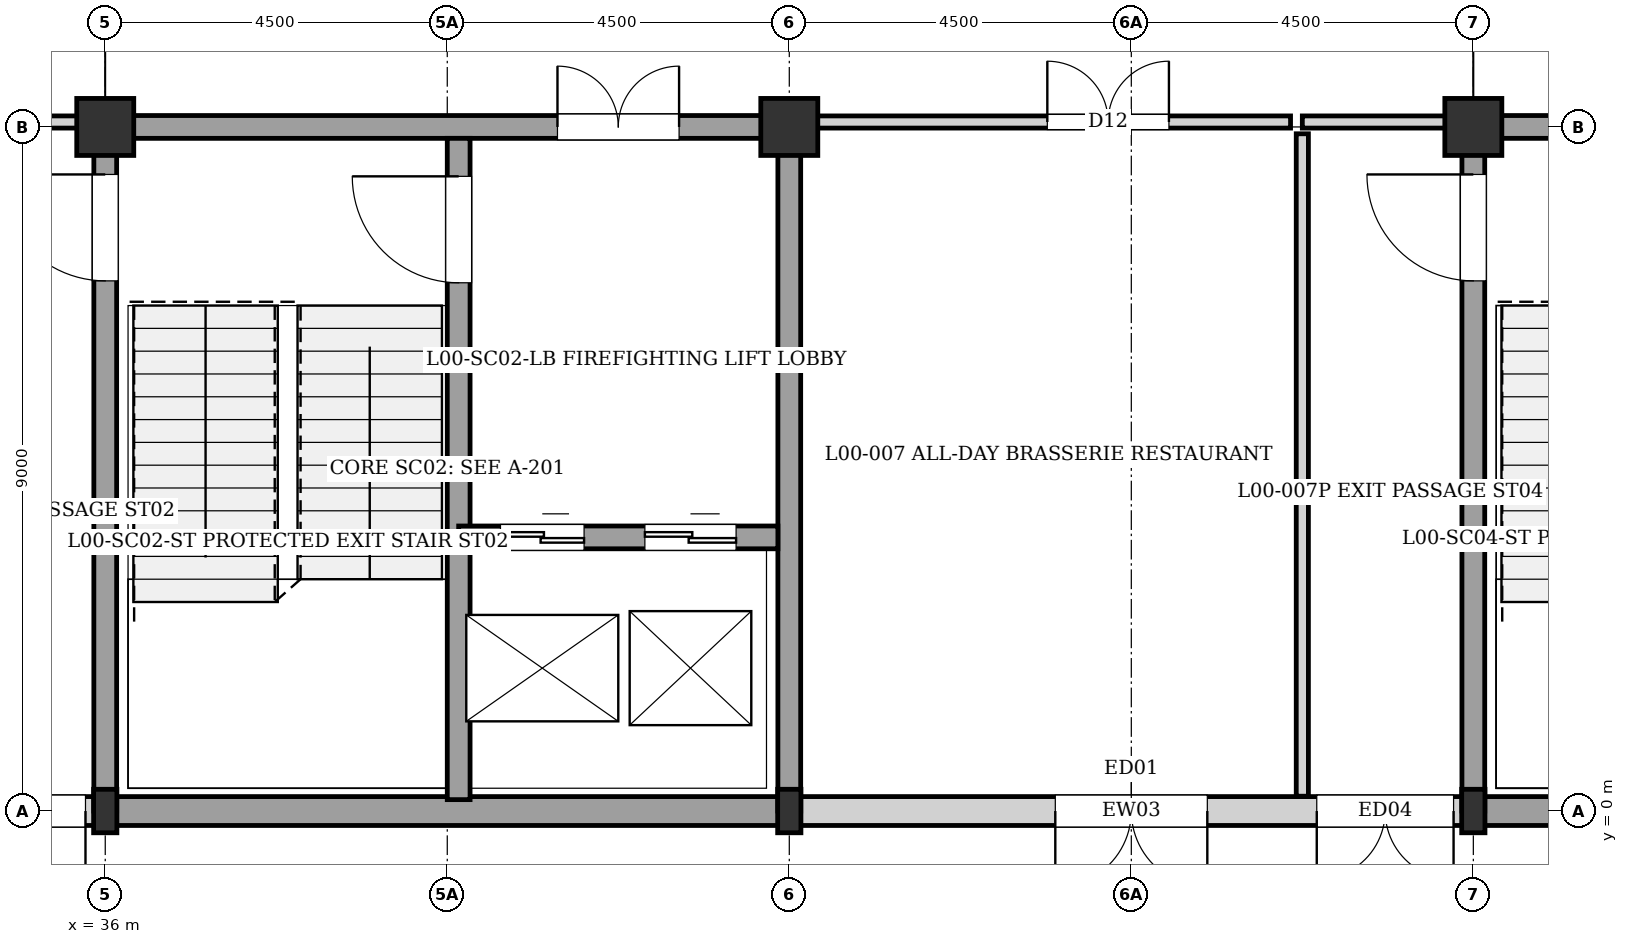
"""IFC4 building model, lengths in metres.
Left out: names, types, materials, properties, quantities, classifications, styles, units other than length and angle.
Written with IfcOpenShell. Run it as: python <this file> out.ifc"""

import sys

from ifc_helpers import new_model, si_unit, direction, frame, frame_2d, origin, origin_2d, place, context, subcontext, project, spatial, rectangle, i_section, extrude, element, fill, save


model = new_model("IFC4")
c1 = context("Model", 3, precision=1e-05, world=origin(), true_north=direction((0.0, 1.0)))
c2 = subcontext(c1, "Body", "Model", "MODEL_VIEW")
j1 = project(units=[si_unit("LENGTHUNIT", "METRE"), si_unit("PLANEANGLEUNIT", "RADIAN")], contexts=[c1])
p1 = place(None, origin())
s1 = spatial("IfcSite", under=j1, at=p1, CompositionType="ELEMENT")
p2 = place(p1, origin())
s2 = spatial("IfcBuilding", under=s1, at=p2, CompositionType="ELEMENT")
p3 = place(p2, origin())
s3 = spatial("IfcBuildingStorey", under=s2, at=p3, CompositionType="ELEMENT", Elevation=0.0)
p4 = place(p3, frame((36.0, 0.0, 0.0), z_axis=(0.0, 0.0, 1.0), x_axis=(1.0, 0.0, 0.0)))
e1 = element("IfcColumn", 1, at=p4, inside=s3, PredefinedType="COLUMN", context=c2, shape_type="SweptSolid", body=[
    extrude(i_section(OverallWidth=0.306, OverallDepth=0.572, WebThickness=0.021, FlangeThickness=0.04, at=origin_2d()), origin(), (0.0, 0.0, 1.0), 4.32),
])
p5 = place(p3, frame((36.0, 9.0, 0.0), z_axis=(0.0, 0.0, 1.0), x_axis=(1.0, 0.0, 0.0)))
e2 = element("IfcColumn", 2, at=p5, inside=s3, PredefinedType="COLUMN", context=c2, shape_type="SweptSolid", body=[
    extrude(rectangle(XDim=0.75, YDim=0.75, at=origin_2d()), origin(), (0.0, 0.0, 1.0), 4.32),
])
p6 = place(p3, frame((45.0, 0.0, 0.0), z_axis=(0.0, 0.0, 1.0), x_axis=(1.0, 0.0, 0.0)))
e3 = element("IfcColumn", 3, at=p6, inside=s3, PredefinedType="COLUMN", context=c2, shape_type="SweptSolid", body=[
    extrude(i_section(OverallWidth=0.306, OverallDepth=0.572, WebThickness=0.021, FlangeThickness=0.04, at=origin_2d()), origin(), (0.0, 0.0, 1.0), 4.32),
])
p7 = place(p3, frame((45.0, 9.0, 0.0), z_axis=(0.0, 0.0, 1.0), x_axis=(1.0, 0.0, 0.0)))
e4 = element("IfcColumn", 4, at=p7, inside=s3, PredefinedType="COLUMN", context=c2, shape_type="SweptSolid", body=[
    extrude(rectangle(XDim=0.75, YDim=0.75, at=origin_2d()), origin(), (0.0, 0.0, 1.0), 4.32),
])
p8 = place(p3, frame((54.0, 0.0, 0.0), z_axis=(0.0, 0.0, 1.0), x_axis=(1.0, 0.0, 0.0)))
e5 = element("IfcColumn", 5, at=p8, inside=s3, PredefinedType="COLUMN", context=c2, shape_type="SweptSolid", body=[
    extrude(i_section(OverallWidth=0.306, OverallDepth=0.572, WebThickness=0.021, FlangeThickness=0.04, at=origin_2d()), origin(), (0.0, 0.0, 1.0), 4.32),
])
p9 = place(p3, frame((54.0, 9.0, 0.0), z_axis=(0.0, 0.0, 1.0), x_axis=(1.0, 0.0, 0.0)))
e6 = element("IfcColumn", 6, at=p9, inside=s3, PredefinedType="COLUMN", context=c2, shape_type="SweptSolid", body=[
    extrude(rectangle(XDim=0.75, YDim=0.75, at=origin_2d()), origin(), (0.0, 0.0, 1.0), 4.32),
])
p10 = place(p3, frame((63.0, 0.0, 0.0), z_axis=(0.0, 0.0, 1.0), x_axis=(-1.0, 0.0, 0.0)))
e7 = element("IfcWall", 7, at=p10, inside=s3, PredefinedType="SOLIDWALL", context=c2, shape_type="SweptSolid", body=[
    extrude(rectangle(XDim=9.0, YDim=0.38, at=frame_2d((4.5, 0.0))), origin(), (0.0, 0.0, 1.0), 4.055),
])
p11 = place(p3, frame((53.87, 0.0, 0.0), z_axis=(0.0, 0.0, 1.0), x_axis=(-1.0, 0.0, 0.0)))
e8 = element("IfcWall", 8, at=p11, inside=s3, PredefinedType="SOLIDWALL", context=c2, shape_type="SweptSolid", body=[
    extrude(rectangle(XDim=8.74, YDim=0.38, at=frame_2d((4.37, 0.0))), origin(), (0.0, 0.0, 1.0), 3.655),
])
p12 = place(p11, frame((0.13, 0.0, 0.0)))
e9 = element("IfcOpeningElement", 9, at=p12, cuts=e8, PredefinedType="OPENING", context=c2, shape_type="SweptSolid", body=[
    extrude(rectangle(XDim=1.8, YDim=2.2, at=frame_2d((0.9, 1.1))), frame((0.0, 0.2, 0.0), z_axis=(0.0, -1.0, 0.0), x_axis=(1.0, 0.0, 0.0)), (0.0, 0.0, 1.0), 0.4),
])
p13 = place(p11, frame((3.37, 0.0, 0.0)))
e10 = element("IfcOpeningElement", 10, at=p13, cuts=e8, PredefinedType="OPENING", context=c2, shape_type="SweptSolid", body=[
    extrude(rectangle(XDim=2.0, YDim=2.4, at=frame_2d((1.0, 1.2))), frame((0.0, 0.2, 0.0), z_axis=(0.0, -1.0, 0.0), x_axis=(1.0, 0.0, 0.0)), (0.0, 0.0, 1.0), 0.4),
])
p14 = place(p3, frame((45.0, 0.0, 0.0), z_axis=(0.0, 0.0, 1.0), x_axis=(-1.0, 0.0, 0.0)))
e11 = element("IfcWall", 11, at=p14, inside=s3, PredefinedType="SOLIDWALL", context=c2, shape_type="SweptSolid", body=[
    extrude(rectangle(XDim=9.0, YDim=0.38, at=frame_2d((4.5, 0.0))), origin(), (0.0, 0.0, 1.0), 4.055),
])
p15 = place(p3, frame((35.87, 0.0, 0.0), z_axis=(0.0, 0.0, 1.0), x_axis=(-1.0, 0.0, 0.0)))
e12 = element("IfcWall", 12, at=p15, inside=s3, PredefinedType="SOLIDWALL", context=c2, shape_type="SweptSolid", body=[
    extrude(rectangle(XDim=8.87, YDim=0.38, at=frame_2d((4.435, 0.0))), origin(), (0.0, 0.0, 1.0), 3.755),
])
p16 = place(p15, frame((0.13, 0.0, 0.0)))
e13 = element("IfcOpeningElement", 13, at=p16, cuts=e12, PredefinedType="OPENING", context=c2, shape_type="SweptSolid", body=[
    extrude(rectangle(XDim=1.8, YDim=2.2, at=frame_2d((0.9, 1.1))), frame((0.0, 0.2, 0.0), z_axis=(0.0, -1.0, 0.0), x_axis=(1.0, 0.0, 0.0)), (0.0, 0.0, 1.0), 0.4),
])
p17 = place(p15, frame((3.37, 0.0, 0.0)))
e14 = element("IfcOpeningElement", 14, at=p17, cuts=e12, PredefinedType="OPENING", context=c2, shape_type="SweptSolid", body=[
    extrude(rectangle(XDim=2.0, YDim=2.4, at=frame_2d((1.0, 1.2))), frame((0.0, 0.2, 0.0), z_axis=(0.0, -1.0, 0.0), x_axis=(1.0, 0.0, 0.0)), (0.0, 0.0, 1.0), 0.4),
])
p18 = place(p3, frame((45.0, 0.0, 0.0), z_axis=(0.0, 0.0, 1.0), x_axis=(0.0, 1.0, 0.0)))
e15 = element("IfcWall", 15, at=p18, inside=s3, PredefinedType="SHEAR", context=c2, shape_type="SweptSolid", body=[
    extrude(rectangle(XDim=9.0, YDim=0.3, at=frame_2d((4.5, 0.0))), origin(), (0.0, 0.0, 1.0), 4.055),
])
p19 = place(p3, frame((36.0, 9.0, 0.0), z_axis=(0.0, 0.0, 1.0), x_axis=(1.0, 0.0, 0.0)))
e16 = element("IfcWall", 16, at=p19, inside=s3, PredefinedType="SHEAR", context=c2, shape_type="SweptSolid", body=[
    extrude(rectangle(XDim=9.0, YDim=0.3, at=frame_2d((4.5, 0.0))), origin(), (0.0, 0.0, 1.0), 4.055),
])
p20 = place(p19, frame((5.95, 0.0, 0.0)))
e17 = element("IfcOpeningElement", 17, at=p20, cuts=e16, PredefinedType="OPENING", context=c2, shape_type="SweptSolid", body=[
    extrude(rectangle(XDim=1.6, YDim=2.1, at=frame_2d((0.8, 1.05))), frame((0.0, 0.16, 0.0), z_axis=(0.0, -1.0, 0.0), x_axis=(1.0, 0.0, 0.0)), (0.0, 0.0, 1.0), 0.32),
])
p21 = place(p3, frame((36.0, 0.0, 0.0), z_axis=(0.0, 0.0, 1.0), x_axis=(0.0, 1.0, 0.0)))
e18 = element("IfcWall", 18, at=p21, inside=s3, PredefinedType="SHEAR", context=c2, shape_type="SweptSolid", body=[
    extrude(rectangle(XDim=9.0, YDim=0.3, at=frame_2d((4.5, 0.0))), origin(), (0.0, 0.0, 1.0), 4.055),
])
p22 = place(p21, frame((6.975, 0.0, 0.0)))
e19 = element("IfcOpeningElement", 19, at=p22, cuts=e18, PredefinedType="OPENING", context=c2, shape_type="SweptSolid", body=[
    extrude(rectangle(XDim=1.4, YDim=2.02, at=frame_2d((0.7, 1.01))), frame((0.0, 0.16, 0.0), z_axis=(0.0, -1.0, 0.0), x_axis=(1.0, 0.0, 0.0)), (0.0, 0.0, 1.0), 0.32),
])
p23 = place(p3, frame((40.65, 0.15, 0.0), z_axis=(0.0, 0.0, 1.0), x_axis=(0.0, 1.0, 0.0)))
e20 = element("IfcWall", 20, at=p23, inside=s3, PredefinedType="SHEAR", context=c2, shape_type="SweptSolid", body=[
    extrude(rectangle(XDim=8.7, YDim=0.3, at=frame_2d((4.35, 0.0))), origin(), (0.0, 0.0, 1.0), 4.055),
])
p24 = place(p23, frame((6.8, 0.0, 0.0)))
e21 = element("IfcOpeningElement", 21, at=p24, cuts=e20, PredefinedType="OPENING", context=c2, shape_type="SweptSolid", body=[
    extrude(rectangle(XDim=1.4, YDim=2.02, at=frame_2d((0.7, 1.01))), frame((0.0, 0.16, 0.0), z_axis=(0.0, -1.0, 0.0), x_axis=(1.0, 0.0, 0.0)), (0.0, 0.0, 1.0), 0.32),
])
p25 = place(p3, frame((40.65, 3.6, 0.0), z_axis=(0.0, 0.0, 1.0), x_axis=(1.0, 0.0, 0.0)))
e22 = element("IfcWall", 22, at=p25, inside=s3, PredefinedType="SHEAR", context=c2, shape_type="SweptSolid", body=[
    extrude(rectangle(XDim=4.2, YDim=0.3, at=frame_2d((2.1, 0.0))), origin(), (0.0, 0.0, 1.0), 4.055),
])
p26 = place(p25, frame((0.55, 0.0, 0.0)))
e23 = element("IfcOpeningElement", 23, at=p26, cuts=e22, PredefinedType="OPENING", context=c2, shape_type="SweptSolid", body=[
    extrude(rectangle(XDim=1.1, YDim=2.1, at=frame_2d((0.55, 1.05))), frame((0.0, 0.16, 0.0), z_axis=(0.0, -1.0, 0.0), x_axis=(1.0, 0.0, 0.0)), (0.0, 0.0, 1.0), 0.32),
])
p27 = place(p25, frame((2.45, 0.0, 0.0)))
e24 = element("IfcOpeningElement", 24, at=p27, cuts=e22, PredefinedType="OPENING", context=c2, shape_type="SweptSolid", body=[
    extrude(rectangle(XDim=1.2, YDim=2.2, at=frame_2d((0.6, 1.1))), frame((0.0, 0.16, 0.0), z_axis=(0.0, -1.0, 0.0), x_axis=(1.0, 0.0, 0.0)), (0.0, 0.0, 1.0), 0.32),
])
p28 = place(p3, frame((54.0, 9.0, 0.0), z_axis=(0.0, 0.0, 1.0), x_axis=(1.0, 0.0, 0.0)))
e25 = element("IfcWall", 25, at=p28, inside=s3, PredefinedType="SHEAR", context=c2, shape_type="SweptSolid", body=[
    extrude(rectangle(XDim=9.0, YDim=0.3, at=frame_2d((4.5, 0.0))), origin(), (0.0, 0.0, 1.0), 4.055),
])
p29 = place(p28, frame((6.05, 0.0, 0.0)))
e26 = element("IfcOpeningElement", 26, at=p29, cuts=e25, PredefinedType="OPENING", context=c2, shape_type="SweptSolid", body=[
    extrude(rectangle(XDim=1.4, YDim=2.02, at=frame_2d((0.7, 1.01))), frame((0.0, 0.16, 0.0), z_axis=(0.0, -1.0, 0.0), x_axis=(1.0, 0.0, 0.0)), (0.0, 0.0, 1.0), 0.32),
])
p30 = place(p3, frame((54.0, 0.0, 0.0), z_axis=(0.0, 0.0, 1.0), x_axis=(0.0, 1.0, 0.0)))
e27 = element("IfcWall", 27, at=p30, inside=s3, PredefinedType="SHEAR", context=c2, shape_type="SweptSolid", body=[
    extrude(rectangle(XDim=9.0, YDim=0.3, at=frame_2d((4.5, 0.0))), origin(), (0.0, 0.0, 1.0), 4.055),
])
p31 = place(p30, frame((6.975, 0.0, 0.0)))
e28 = element("IfcOpeningElement", 28, at=p31, cuts=e27, PredefinedType="OPENING", context=c2, shape_type="SweptSolid", body=[
    extrude(rectangle(XDim=1.4, YDim=2.02, at=frame_2d((0.7, 1.01))), frame((0.0, 0.16, 0.0), z_axis=(0.0, -1.0, 0.0), x_axis=(1.0, 0.0, 0.0)), (0.0, 0.0, 1.0), 0.32),
])
p32 = place(p3, frame((33.75, 9.065, 0.0), z_axis=(0.0, 0.0, 1.0), x_axis=(1.0, 0.0, 0.0)))
e29 = element("IfcWall", 29, at=p32, inside=s3, PredefinedType="PARTITIONING", context=c2, shape_type="SweptSolid", body=[
    extrude(rectangle(XDim=2.095, YDim=0.16, at=frame_2d((1.047, 0.0))), origin(), (0.0, 0.0, 1.0), 4.055),
])
p33 = place(p3, frame((51.75, 9.065, 0.0), z_axis=(0.0, 0.0, 1.0), x_axis=(1.0, 0.0, 0.0)))
e30 = element("IfcWall", 30, at=p33, inside=s3, PredefinedType="PARTITIONING", context=c2, shape_type="SweptSolid", body=[
    extrude(rectangle(XDim=2.095, YDim=0.16, at=frame_2d((1.047, 0.0))), origin(), (0.0, 0.0, 1.0), 3.725),
])
p34 = place(p3, frame((51.75, 0.195, 0.0), z_axis=(0.0, 0.0, 1.0), x_axis=(0.0, 1.0, 0.0)))
e31 = element("IfcWall", 31, at=p34, inside=s3, PredefinedType="PARTITIONING", context=c2, shape_type="SweptSolid", body=[
    extrude(rectangle(XDim=8.715, YDim=0.16, at=frame_2d((4.357, 0.0))), origin(), (0.0, 0.0, 1.0), 4.055),
])
p35 = place(p3, frame((45.155, 9.065, 0.0), z_axis=(0.0, 0.0, 1.0), x_axis=(1.0, 0.0, 0.0)))
e32 = element("IfcWall", 32, at=p35, inside=s3, PredefinedType="PARTITIONING", context=c2, shape_type="SweptSolid", body=[
    extrude(rectangle(XDim=6.44, YDim=0.16, at=frame_2d((3.22, 0.0))), origin(), (0.0, 0.0, 1.0), 3.725),
])
p36 = place(p35, frame((3.24, 0.0, 0.0)))
e33 = element("IfcOpeningElement", 33, at=p36, cuts=e32, PredefinedType="OPENING", context=c2, shape_type="SweptSolid", body=[
    extrude(rectangle(XDim=1.6, YDim=2.3, at=frame_2d((0.8, 1.15))), frame((0.0, 0.09, 0.0), z_axis=(0.0, -1.0, 0.0), x_axis=(1.0, 0.0, 0.0)), (0.0, 0.0, 1.0), 0.18),
])
p37 = place(p12, origin())
e34 = element("IfcDoor", 34, at=p37, inside=s3, OperationType="DOUBLE_DOOR_SINGLE_SWING", PredefinedType="DOOR", context=c2, shape_type="SweptSolid", body=[
    extrude(rectangle(XDim=1.8, YDim=2.2, at=frame_2d((0.9, 1.1))), frame((0.0, 0.025, 0.0), z_axis=(0.0, -1.0, 0.0), x_axis=(1.0, 0.0, 0.0)), (0.0, 0.0, 1.0), 0.05),
])
fill(e9, e34)
p38 = place(p13, origin())
e35 = element("IfcDoor", 35, at=p38, inside=s3, OperationType="DOUBLE_DOOR_SINGLE_SWING", PredefinedType="DOOR", context=c2, shape_type="SweptSolid", body=[
    extrude(rectangle(XDim=2.0, YDim=2.4, at=frame_2d((1.0, 1.2))), frame((0.0, 0.025, 0.0), z_axis=(0.0, -1.0, 0.0), x_axis=(1.0, 0.0, 0.0)), (0.0, 0.0, 1.0), 0.05),
])
fill(e10, e35)
p39 = place(p16, origin())
e36 = element("IfcDoor", 36, at=p39, inside=s3, OperationType="DOUBLE_DOOR_SINGLE_SWING", PredefinedType="DOOR", context=c2, shape_type="SweptSolid", body=[
    extrude(rectangle(XDim=1.8, YDim=2.2, at=frame_2d((0.9, 1.1))), frame((0.0, 0.025, 0.0), z_axis=(0.0, -1.0, 0.0), x_axis=(1.0, 0.0, 0.0)), (0.0, 0.0, 1.0), 0.05),
])
fill(e13, e36)
p40 = place(p20, origin())
e37 = element("IfcDoor", 37, at=p40, inside=s3, OperationType="DOUBLE_DOOR_SINGLE_SWING", PredefinedType="DOOR", context=c2, shape_type="SweptSolid", body=[
    extrude(rectangle(XDim=1.6, YDim=2.1, at=frame_2d((0.8, 1.05))), frame((0.0, 0.025, 0.0), z_axis=(0.0, -1.0, 0.0), x_axis=(1.0, 0.0, 0.0)), (0.0, 0.0, 1.0), 0.05),
])
fill(e17, e37)
p41 = place(p22, origin())
e38 = element("IfcDoor", 38, at=p41, inside=s3, OperationType="SINGLE_SWING_RIGHT", PredefinedType="DOOR", context=c2, shape_type="SweptSolid", body=[
    extrude(rectangle(XDim=1.4, YDim=2.02, at=frame_2d((0.7, 1.01))), frame((0.0, 0.025, 0.0), z_axis=(0.0, -1.0, 0.0), x_axis=(1.0, 0.0, 0.0)), (0.0, 0.0, 1.0), 0.05),
])
fill(e19, e38)
p42 = place(p24, origin())
e39 = element("IfcDoor", 39, at=p42, inside=s3, OperationType="SINGLE_SWING_RIGHT", PredefinedType="DOOR", context=c2, shape_type="SweptSolid", body=[
    extrude(rectangle(XDim=1.4, YDim=2.02, at=frame_2d((0.7, 1.01))), frame((0.0, 0.025, 0.0), z_axis=(0.0, -1.0, 0.0), x_axis=(1.0, 0.0, 0.0)), (0.0, 0.0, 1.0), 0.05),
])
fill(e21, e39)
p43 = place(p26, origin())
e40 = element("IfcDoor", 40, at=p43, inside=s3, OperationType="DOUBLE_DOOR_SLIDING", PredefinedType="DOOR", context=c2, shape_type="SweptSolid", body=[
    extrude(rectangle(XDim=1.1, YDim=2.1, at=frame_2d((0.55, 1.05))), frame((0.0, 0.025, 0.0), z_axis=(0.0, -1.0, 0.0), x_axis=(1.0, 0.0, 0.0)), (0.0, 0.0, 1.0), 0.05),
])
fill(e23, e40)
p44 = place(p27, origin())
e41 = element("IfcDoor", 41, at=p44, inside=s3, OperationType="DOUBLE_DOOR_SLIDING", PredefinedType="DOOR", context=c2, shape_type="SweptSolid", body=[
    extrude(rectangle(XDim=1.2, YDim=2.2, at=frame_2d((0.6, 1.1))), frame((0.0, 0.025, 0.0), z_axis=(0.0, -1.0, 0.0), x_axis=(1.0, 0.0, 0.0)), (0.0, 0.0, 1.0), 0.05),
])
fill(e24, e41)
p45 = place(p31, origin())
e42 = element("IfcDoor", 42, at=p45, inside=s3, OperationType="SINGLE_SWING_RIGHT", PredefinedType="DOOR", context=c2, shape_type="SweptSolid", body=[
    extrude(rectangle(XDim=1.4, YDim=2.02, at=frame_2d((0.7, 1.01))), frame((0.0, 0.025, 0.0), z_axis=(0.0, -1.0, 0.0), x_axis=(1.0, 0.0, 0.0)), (0.0, 0.0, 1.0), 0.05),
])
fill(e28, e42)
p46 = place(p36, origin())
e43 = element("IfcDoor", 43, at=p46, inside=s3, OperationType="DOUBLE_DOOR_SINGLE_SWING", PredefinedType="DOOR", context=c2, shape_type="SweptSolid", body=[
    extrude(rectangle(XDim=1.6, YDim=2.3, at=frame_2d((0.8, 1.15))), frame((0.0, 0.025, 0.0), z_axis=(0.0, -1.0, 0.0), x_axis=(1.0, 0.0, 0.0)), (0.0, 0.0, 1.0), 0.05),
])
fill(e33, e43)
save(model, sys.argv[1])
